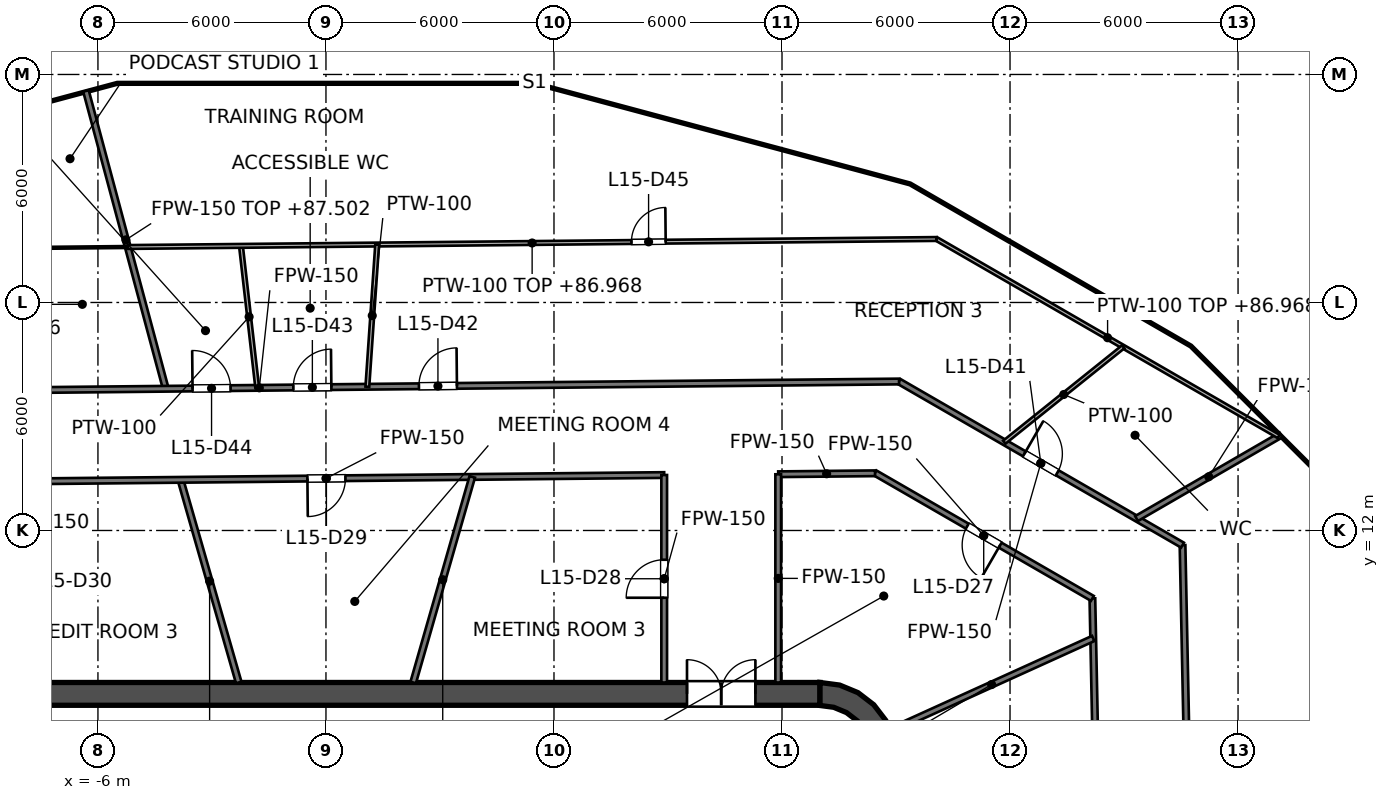
"""IFC4 building model, lengths in metres.
Left out: names, types, materials, properties, quantities, classifications, styles, units other than length and angle.
Written with IfcOpenShell. Run it as: python <this file> out.ifc"""

import sys

from ifc_helpers import new_model, si_unit, direction, frame, frame_2d, origin, place, context, subcontext, project, spatial, polyline, rectangle, outline, extrude, element, fill, save


model = new_model("IFC4")
c1 = context("Model", 3, precision=1e-05, world=origin(), true_north=direction((0.0, 1.0)))
c2 = subcontext(c1, "Body", "Model", "MODEL_VIEW")
j1 = project(units=[si_unit("LENGTHUNIT", "METRE"), si_unit("PLANEANGLEUNIT", "RADIAN")], contexts=[c1])
p1 = place(None, origin())
s1 = spatial("IfcSite", under=j1, at=p1, CompositionType="ELEMENT")
p2 = place(p1, origin())
s2 = spatial("IfcBuilding", under=s1, at=p2, CompositionType="ELEMENT")
p3 = place(p2, frame((0.0, 0.0, 84.0)))
s3 = spatial("IfcBuildingStorey", under=s2, at=p3, CompositionType="ELEMENT", Elevation=84.0)
p4 = place(p3, frame((-13.0, 7.7, 0.0), z_axis=(0.0, 0.0, 1.0), x_axis=(1.0, 0.0, 0.0)))
e1 = element("IfcWall", 1, at=p4, inside=s3, PredefinedType="SHEAR", context=c2, shape_type="SweptSolid", body=[
    extrude(rectangle(XDim=26.0, YDim=0.6, at=frame_2d((13.0, 0.0))), origin(), (0.0, 0.0, 1.0), 4.2),
])
p5 = place(p4, frame((1.7, 0.0, 0.0)))
e2 = element("IfcOpeningElement", 2, at=p5, cuts=e1, PredefinedType="OPENING", context=c2, shape_type="SweptSolid", body=[
    extrude(rectangle(XDim=1.8, YDim=2.1, at=frame_2d((0.9, 1.05))), frame((0.0, 0.3, 0.0), z_axis=(0.0, -1.0, 0.0), x_axis=(1.0, 0.0, 0.0)), (0.0, 0.0, 1.0), 0.6),
])
p6 = place(p4, frame((22.5, 0.0, 0.0)))
e3 = element("IfcOpeningElement", 3, at=p6, cuts=e1, PredefinedType="OPENING", context=c2, shape_type="SweptSolid", body=[
    extrude(rectangle(XDim=1.8, YDim=2.1, at=frame_2d((0.9, 1.05))), frame((0.0, 0.3, 0.0), z_axis=(0.0, -1.0, 0.0), x_axis=(1.0, 0.0, 0.0)), (0.0, 0.0, 1.0), 0.6),
])
p7 = place(p3, origin())
e4 = element("IfcWall", 4, at=p7, inside=s3, PredefinedType="SHEAR", context=c2, shape_type="SweptSolid", body=[
    extrude(outline(polyline([(13.0, 8.0), (13.0, 7.395), (13.361, 7.347), (13.698, 7.208), (13.986, 6.986), (14.208, 6.698), (14.347, 6.361), (14.395, 6.0), (15.0, 6.0), (14.932, 6.518), (14.732, 7.0), (14.414, 7.414), (14.0, 7.732), (13.518, 7.932), (13.0, 8.0)])), origin(), (0.0, 0.0, 1.0), 4.2),
])
p8 = place(p3, frame((-9.125, 7.0, 0.0), z_axis=(0.0, 0.0, 1.0), x_axis=(1.0, 0.0, 0.0)))
e5 = element("IfcWall", 5, at=p8, inside=s3, PredefinedType="SOLIDWALL", context=c2, shape_type="SweptSolid", body=[
    extrude(rectangle(XDim=18.25, YDim=0.8, at=frame_2d((9.125, 0.0))), origin(), (0.0, 0.0, 1.0), 4.05),
])
p9 = place(p3, frame((11.8, -7.4, 0.0), z_axis=(0.0, 0.0, 1.0), x_axis=(0.0, 1.0, 0.0)))
e6 = element("IfcWall", 6, at=p9, inside=s3, PredefinedType="SOLIDWALL", context=c2, shape_type="SweptSolid", body=[
    extrude(rectangle(XDim=14.8, YDim=0.4, at=frame_2d((7.4, 0.0))), origin(), (0.0, 0.0, 1.0), 4.05),
])
p10 = place(p9, frame((11.2, 0.0, 0.0)))
e7 = element("IfcOpeningElement", 7, at=p10, cuts=e6, PredefinedType="OPENING", context=c2, shape_type="SweptSolid", body=[
    extrude(rectangle(XDim=1.1, YDim=2.1, at=frame_2d((0.55, 1.05))), frame((0.0, 0.2, 0.0), z_axis=(0.0, -1.0, 0.0), x_axis=(1.0, 0.0, 0.0)), (0.0, 0.0, 1.0), 0.4),
])
p11 = place(p9, frame((8.3, 0.0, 0.0)))
e8 = element("IfcOpeningElement", 8, at=p11, cuts=e6, PredefinedType="OPENING", context=c2, shape_type="SweptSolid", body=[
    extrude(rectangle(XDim=1.1, YDim=2.1, at=frame_2d((0.55, 1.05))), frame((0.0, 0.2, 0.0), z_axis=(0.0, -1.0, 0.0), x_axis=(1.0, 0.0, 0.0)), (0.0, 0.0, 1.0), 0.4),
])
p12 = place(p9, frame((5.4, 0.0, 0.0)))
e9 = element("IfcOpeningElement", 9, at=p12, cuts=e6, PredefinedType="OPENING", context=c2, shape_type="SweptSolid", body=[
    extrude(rectangle(XDim=1.1, YDim=2.1, at=frame_2d((0.55, 1.05))), frame((0.0, 0.2, 0.0), z_axis=(0.0, -1.0, 0.0), x_axis=(1.0, 0.0, 0.0)), (0.0, 0.0, 1.0), 0.4),
])
p13 = place(p9, frame((13.552, 0.0, 0.0)))
e10 = element("IfcOpeningElement", 10, at=p13, cuts=e6, PredefinedType="OPENING", context=c2, shape_type="SweptSolid", body=[
    extrude(rectangle(XDim=0.9, YDim=2.1, at=frame_2d((0.45, 1.05))), frame((0.0, 0.2, 0.0), z_axis=(0.0, -1.0, 0.0), x_axis=(1.0, 0.0, 0.0)), (0.0, 0.0, 1.0), 0.4),
])
p14 = place(p9, frame((0.347, 0.0, 0.0)))
e11 = element("IfcOpeningElement", 11, at=p14, cuts=e6, PredefinedType="OPENING", context=c2, shape_type="SweptSolid", body=[
    extrude(rectangle(XDim=0.9, YDim=2.1, at=frame_2d((0.45, 1.05))), frame((0.0, 0.2, 0.0), z_axis=(0.0, -1.0, 0.0), x_axis=(1.0, 0.0, 0.0)), (0.0, 0.0, 1.0), 0.4),
])
p15 = place(p3, frame((20.167, 10.213, 0.0), z_axis=(0.0, 0.0, 1.0), x_axis=(0.020610894613, -0.999787572949, 0.0)))
e12 = element("IfcWall", 12, at=p15, inside=s3, PredefinedType="PARTITIONING", context=c2, shape_type="SweptSolid", body=[
    extrude(rectangle(XDim=17.637, YDim=0.15, at=frame_2d((8.819, 0.0))), origin(), (0.0, 0.0, 1.0), 2.968),
])
p16 = place(p15, frame((10.508, 0.0, 0.0)))
e13 = element("IfcOpeningElement", 13, at=p16, cuts=e12, PredefinedType="OPENING", context=c2, shape_type="SweptSolid", body=[
    extrude(rectangle(XDim=1.0, YDim=2.1, at=frame_2d((0.5, 1.05))), frame((0.0, 0.075, 0.0), z_axis=(0.0, -1.0, 0.0), x_axis=(1.0, 0.0, 0.0)), (0.0, 0.0, 1.0), 0.15),
])
p17 = place(p15, frame((5.09, 0.0, 0.0)))
e14 = element("IfcOpeningElement", 14, at=p17, cuts=e12, PredefinedType="OPENING", context=c2, shape_type="SweptSolid", body=[
    extrude(rectangle(XDim=1.0, YDim=2.1, at=frame_2d((0.5, 1.05))), frame((0.0, 0.075, 0.0), z_axis=(0.0, -1.0, 0.0), x_axis=(1.0, 0.0, 0.0)), (0.0, 0.0, 1.0), 0.15),
])
p18 = place(p3, frame((22.539, 11.615, 0.0), z_axis=(0.0, 0.0, 1.0), x_axis=(0.020601506683, -0.99978776644, 0.0)))
e15 = element("IfcWall", 15, at=p18, inside=s3, PredefinedType="PARTITIONING", context=c2, shape_type="SweptSolid", body=[
    extrude(rectangle(XDim=19.66, YDim=0.15, at=frame_2d((9.83, 0.0))), origin(), (0.0, 0.0, 1.0), 2.968),
])
p19 = place(p18, frame((13.54, 0.0, 0.0)))
e16 = element("IfcOpeningElement", 16, at=p19, cuts=e15, PredefinedType="OPENING", context=c2, shape_type="SweptSolid", body=[
    extrude(rectangle(XDim=1.0, YDim=2.1, at=frame_2d((0.5, 1.05))), frame((0.0, 0.075, 0.0), z_axis=(0.0, -1.0, 0.0), x_axis=(1.0, 0.0, 0.0)), (0.0, 0.0, 1.0), 0.15),
])
p20 = place(p18, frame((9.23, 0.0, 0.0)))
e17 = element("IfcOpeningElement", 17, at=p20, cuts=e15, PredefinedType="OPENING", context=c2, shape_type="SweptSolid", body=[
    extrude(rectangle(XDim=1.0, YDim=2.1, at=frame_2d((0.5, 1.05))), frame((0.0, 0.075, 0.0), z_axis=(0.0, -1.0, 0.0), x_axis=(1.0, 0.0, 0.0)), (0.0, 0.0, 1.0), 0.15),
])
p21 = place(p3, frame((-6.315, 23.566, 0.0), z_axis=(0.0, 0.0, 1.0), x_axis=(0.258844392232, -0.96591903419, 0.0)))
e18 = element("IfcWall", 18, at=p21, inside=s3, PredefinedType="PARTITIONING", context=c2, shape_type="SweptSolid", body=[
    extrude(rectangle(XDim=8.112, YDim=0.15, at=frame_2d((4.056, 0.0))), origin(), (0.0, 0.0, 1.0), 3.502),
])
p22 = place(p3, frame((-3.827, 13.333, 0.0), z_axis=(0.0, 0.0, 1.0), x_axis=(0.275935525478, -0.961176147113, 0.0)))
e19 = element("IfcWall", 19, at=p22, inside=s3, PredefinedType="PARTITIONING", context=c2, shape_type="SweptSolid", body=[
    extrude(rectangle(XDim=5.548, YDim=0.15, at=frame_2d((2.774, 0.0))), origin(), (0.0, 0.0, 1.0), 3.9),
])
p23 = place(p3, frame((14.448, 13.515, 0.0), z_axis=(0.0, 0.0, 1.0), x_axis=(0.866032288321, -0.499988075443, 0.0)))
e20 = element("IfcWall", 20, at=p23, inside=s3, PredefinedType="PARTITIONING", context=c2, shape_type="SweptSolid", body=[
    extrude(rectangle(XDim=6.604, YDim=0.15, at=frame_2d((3.302, 0.0))), origin(), (0.0, 0.0, 1.0), 2.968),
])
p24 = place(p23, frame((2.802, 0.0, 0.0)))
e21 = element("IfcOpeningElement", 21, at=p24, cuts=e20, PredefinedType="OPENING", context=c2, shape_type="SweptSolid", body=[
    extrude(rectangle(XDim=1.0, YDim=2.1, at=frame_2d((0.5, 1.05))), frame((0.0, 0.075, 0.0), z_axis=(0.0, -1.0, 0.0), x_axis=(1.0, 0.0, 0.0)), (0.0, 0.0, 1.0), 0.15),
])
p25 = place(p3, frame((15.08, 15.921, 0.0), z_axis=(0.0, 0.0, 1.0), x_axis=(0.866020838546, -0.500007907142, 0.0)))
e22 = element("IfcWall", 22, at=p25, inside=s3, PredefinedType="PARTITIONING", context=c2, shape_type="SweptSolid", body=[
    extrude(rectangle(XDim=8.613, YDim=0.15, at=frame_2d((4.306, 0.0))), origin(), (0.0, 0.0, 1.0), 2.968),
])
p26 = place(p25, frame((3.807, 0.0, 0.0)))
e23 = element("IfcOpeningElement", 23, at=p26, cuts=e22, PredefinedType="OPENING", context=c2, shape_type="SweptSolid", body=[
    extrude(rectangle(XDim=1.0, YDim=2.1, at=frame_2d((0.5, 1.05))), frame((0.0, 0.075, 0.0), z_axis=(0.0, -1.0, 0.0), x_axis=(1.0, 0.0, 0.0)), (0.0, 0.0, 1.0), 0.15),
])
p27 = place(p3, frame((-8.9, 13.282, 0.0), z_axis=(0.0, 0.0, 1.0), x_axis=(0.999950834077, 0.009916119672, 0.0)))
e24 = element("IfcWall", 24, at=p27, inside=s3, PredefinedType="PARTITIONING", context=c2, shape_type="SweptSolid", body=[
    extrude(rectangle(XDim=17.801, YDim=0.15, at=frame_2d((8.9, 0.0))), origin(), (0.0, 0.0, 1.0), 2.968),
])
p28 = place(p27, frame((8.412, 0.0, 0.0)))
e25 = element("IfcOpeningElement", 25, at=p28, cuts=e24, PredefinedType="OPENING", context=c2, shape_type="SweptSolid", body=[
    extrude(rectangle(XDim=1.0, YDim=2.1, at=frame_2d((0.5, 1.05))), frame((0.0, 0.075, 0.0), z_axis=(0.0, -1.0, 0.0), x_axis=(1.0, 0.0, 0.0)), (0.0, 0.0, 1.0), 0.15),
])
p29 = place(p3, frame((11.9, 13.48, 0.0), z_axis=(0.0, 0.0, 1.0), x_axis=(0.999950357576, 0.009964054536, 0.0)))
e26 = element("IfcWall", 26, at=p29, inside=s3, PredefinedType="PARTITIONING", context=c2, shape_type="SweptSolid", body=[
    extrude(rectangle(XDim=2.548, YDim=0.15, at=frame_2d((1.274, 0.0))), origin(), (0.0, 0.0, 1.0), 2.968),
])
p30 = place(p3, frame((-18.587, 15.587, 0.0), z_axis=(0.0, 0.0, 1.0), x_axis=(0.99995087003, 0.009912493396, 0.0)))
e27 = element("IfcWall", 27, at=p30, inside=s3, PredefinedType="PARTITIONING", context=c2, shape_type="SweptSolid", body=[
    extrude(rectangle(XDim=33.669, YDim=0.15, at=frame_2d((16.834, 0.0))), origin(), (0.0, 0.0, 1.0), 2.968),
])
p31 = place(p30, frame((21.034, 0.0, 0.0)))
e28 = element("IfcOpeningElement", 28, at=p31, cuts=e27, PredefinedType="OPENING", context=c2, shape_type="SweptSolid", body=[
    extrude(rectangle(XDim=1.0, YDim=2.1, at=frame_2d((0.5, 1.05))), frame((0.0, 0.075, 0.0), z_axis=(0.0, -1.0, 0.0), x_axis=(1.0, 0.0, 0.0)), (0.0, 0.0, 1.0), 0.15),
])
p32 = place(p30, frame((17.73, 0.0, 0.0)))
e29 = element("IfcOpeningElement", 29, at=p32, cuts=e27, PredefinedType="OPENING", context=c2, shape_type="SweptSolid", body=[
    extrude(rectangle(XDim=1.0, YDim=2.1, at=frame_2d((0.5, 1.05))), frame((0.0, 0.075, 0.0), z_axis=(0.0, -1.0, 0.0), x_axis=(1.0, 0.0, 0.0)), (0.0, 0.0, 1.0), 0.15),
])
p33 = place(p30, frame((15.077, 0.0, 0.0)))
e30 = element("IfcOpeningElement", 30, at=p33, cuts=e27, PredefinedType="OPENING", context=c2, shape_type="SweptSolid", body=[
    extrude(rectangle(XDim=1.0, YDim=2.1, at=frame_2d((0.5, 1.05))), frame((0.0, 0.075, 0.0), z_axis=(0.0, -1.0, 0.0), x_axis=(1.0, 0.0, 0.0)), (0.0, 0.0, 1.0), 0.15),
])
p34 = place(p30, frame((10.026, 0.0, 0.0)))
e31 = element("IfcOpeningElement", 31, at=p34, cuts=e27, PredefinedType="OPENING", context=c2, shape_type="SweptSolid", body=[
    extrude(rectangle(XDim=1.0, YDim=2.1, at=frame_2d((0.5, 1.05))), frame((0.0, 0.075, 0.0), z_axis=(0.0, -1.0, 0.0), x_axis=(1.0, 0.0, 0.0)), (0.0, 0.0, 1.0), 0.15),
])
p35 = place(p30, frame((2.737, 0.0, 0.0)))
e32 = element("IfcOpeningElement", 32, at=p35, cuts=e27, PredefinedType="OPENING", context=c2, shape_type="SweptSolid", body=[
    extrude(rectangle(XDim=1.0, YDim=2.1, at=frame_2d((0.5, 1.05))), frame((0.0, 0.075, 0.0), z_axis=(0.0, -1.0, 0.0), x_axis=(1.0, 0.0, 0.0)), (0.0, 0.0, 1.0), 0.15),
])
p36 = place(p3, frame((14.843, 6.733, 0.0), z_axis=(0.0, 0.0, 1.0), x_axis=(0.910628361306, 0.413226315214, 0.0)))
e33 = element("IfcWall", 33, at=p36, inside=s3, PredefinedType="PARTITIONING", context=c2, shape_type="SweptSolid", body=[
    extrude(rectangle(XDim=5.87, YDim=0.15, at=frame_2d((2.935, 0.0))), origin(), (0.0, 0.0, 1.0), 3.9),
])
p37 = place(p3, frame((21.329, 12.314, 0.0), z_axis=(0.0, 0.0, 1.0), x_axis=(0.865416132284, 0.501053807472, 0.0)))
e34 = element("IfcWall", 34, at=p37, inside=s3, PredefinedType="PARTITIONING", context=c2, shape_type="SweptSolid", body=[
    extrude(rectangle(XDim=4.39, YDim=0.15, at=frame_2d((2.195, 0.0))), origin(), (0.0, 0.0, 1.0), 3.045),
])
p38 = place(p3, frame((2.296, 8.0, 0.0), z_axis=(0.0, 0.0, 1.0), x_axis=(0.275958345059, 0.961169595749, 0.0)))
e35 = element("IfcWall", 35, at=p38, inside=s3, PredefinedType="PARTITIONING", context=c2, shape_type="SweptSolid", body=[
    extrude(rectangle(XDim=5.628, YDim=0.15, at=frame_2d((2.814, 0.0))), origin(), (0.0, 0.0, 1.0), 3.9),
])
p39 = place(p3, frame((11.9, 8.0, 0.0), z_axis=(0.0, 0.0, 1.0), x_axis=(0.0, 1.0, 0.0)))
e36 = element("IfcWall", 36, at=p39, inside=s3, PredefinedType="PARTITIONING", context=c2, shape_type="SweptSolid", body=[
    extrude(rectangle(XDim=5.479, YDim=0.15, at=frame_2d((2.74, 0.0))), origin(), (0.0, 0.0, 1.0), 2.968),
])
p40 = place(p3, frame((8.9, 8.0, 0.0), z_axis=(0.0, 0.0, 1.0), x_axis=(0.0, 1.0, 0.0)))
e37 = element("IfcWall", 37, at=p40, inside=s3, PredefinedType="PARTITIONING", context=c2, shape_type="SweptSolid", body=[
    extrude(rectangle(XDim=5.46, YDim=0.15, at=frame_2d((2.73, 0.0))), origin(), (0.0, 0.0, 1.0), 2.968),
])
p41 = place(p40, frame((2.23, 0.0, 0.0)))
e38 = element("IfcOpeningElement", 38, at=p41, cuts=e37, PredefinedType="OPENING", context=c2, shape_type="SweptSolid", body=[
    extrude(rectangle(XDim=1.0, YDim=2.1, at=frame_2d((0.5, 1.05))), frame((0.0, 0.075, 0.0), z_axis=(0.0, -1.0, 0.0), x_axis=(1.0, 0.0, 0.0)), (0.0, 0.0, 1.0), 0.15),
])
p42 = place(p3, frame((-18.512, 19.328, 0.0), z_axis=(0.0, 0.0, 1.0), x_axis=(0.999950851933, 0.009914318817, 0.0)))
e39 = element("IfcWall", 39, at=p42, inside=s3, PredefinedType="PARTITIONING", context=c2, shape_type="SweptSolid", body=[
    extrude(rectangle(XDim=13.298, YDim=0.05, at=frame_2d((6.649, 0.0))), origin(), (0.0, 0.0, 1.0), 2.968),
])
p43 = place(p42, frame((7.975, 0.0, 0.0)))
e40 = element("IfcOpeningElement", 40, at=p43, cuts=e39, PredefinedType="OPENING", context=c2, shape_type="SweptSolid", body=[
    extrude(rectangle(XDim=1.0, YDim=2.1, at=frame_2d((0.5, 1.05))), frame((0.0, 0.025, 0.0), z_axis=(0.0, -1.0, 0.0), x_axis=(1.0, 0.0, 0.0)), (0.0, 0.0, 1.0), 0.05),
])
p44 = place(p42, frame((2.003, 0.0, 0.0)))
e41 = element("IfcOpeningElement", 41, at=p44, cuts=e39, PredefinedType="OPENING", context=c2, shape_type="SweptSolid", body=[
    extrude(rectangle(XDim=1.0, YDim=2.1, at=frame_2d((0.5, 1.05))), frame((0.0, 0.025, 0.0), z_axis=(0.0, -1.0, 0.0), x_axis=(1.0, 0.0, 0.0)), (0.0, 0.0, 1.0), 0.05),
])
p45 = place(p3, frame((-2.237, 19.49, 0.0), z_axis=(0.0, 0.0, 1.0), x_axis=(0.114064733863, -0.993473319465, 0.0)))
e42 = element("IfcWall", 42, at=p45, inside=s3, PredefinedType="PARTITIONING", context=c2, shape_type="SweptSolid", body=[
    extrude(rectangle(XDim=3.761, YDim=0.1, at=frame_2d((1.88, 0.0))), origin(), (0.0, 0.0, 1.0), 3.9),
])
p46 = place(p3, frame((16.065, 19.671, 0.0), z_axis=(0.0, 0.0, 1.0), x_axis=(0.866058502288, -0.499942667328, 0.0)))
e43 = element("IfcWall", 43, at=p46, inside=s3, PredefinedType="PARTITIONING", context=c2, shape_type="SweptSolid", body=[
    extrude(rectangle(XDim=10.397, YDim=0.1, at=frame_2d((5.198, 0.0))), origin(), (0.0, 0.0, 1.0), 2.968),
])
p47 = place(p3, frame((-5.215, 19.46, 0.0), z_axis=(0.0, 0.0, 1.0), x_axis=(0.999950988801, 0.00990050484, 0.0)))
e44 = element("IfcWall", 44, at=p47, inside=s3, PredefinedType="PARTITIONING", context=c2, shape_type="SweptSolid", body=[
    extrude(rectangle(XDim=21.281, YDim=0.1, at=frame_2d((10.641, 0.0))), origin(), (0.0, 0.0, 1.0), 2.968),
])
p48 = place(p47, frame((13.255, 0.0, 0.0)))
e45 = element("IfcOpeningElement", 45, at=p48, cuts=e44, PredefinedType="OPENING", context=c2, shape_type="SweptSolid", body=[
    extrude(rectangle(XDim=0.9, YDim=2.1, at=frame_2d((0.45, 1.05))), frame((0.0, 0.05, 0.0), z_axis=(0.0, -1.0, 0.0), x_axis=(1.0, 0.0, 0.0)), (0.0, 0.0, 1.0), 0.1),
])
p49 = place(p3, frame((17.849, 14.323, 0.0), z_axis=(0.0, 0.0, 1.0), x_axis=(0.7800073623, 0.625770337071, 0.0)))
e46 = element("IfcWall", 46, at=p49, inside=s3, PredefinedType="PARTITIONING", context=c2, shape_type="SweptSolid", body=[
    extrude(rectangle(XDim=4.013, YDim=0.1, at=frame_2d((2.006, 0.0))), origin(), (0.0, 0.0, 1.0), 3.9),
])
p50 = place(p3, frame((1.089, 15.783, 0.0), z_axis=(0.0, 0.0, 1.0), x_axis=(0.068735075686, 0.99763494795, 0.0)))
e47 = element("IfcWall", 47, at=p50, inside=s3, PredefinedType="PARTITIONING", context=c2, shape_type="SweptSolid", body=[
    extrude(rectangle(XDim=3.751, YDim=0.1, at=frame_2d((1.875, 0.0))), origin(), (0.0, 0.0, 1.0), 3.9),
])
p51 = place(p13, origin())
e48 = element("IfcDoor", 48, at=p51, inside=s3, OperationType="SINGLE_SWING_RIGHT", PredefinedType="DOOR", context=c2, shape_type="SweptSolid", body=[
    extrude(rectangle(XDim=0.9, YDim=2.1, at=frame_2d((0.45, 1.05))), frame((0.0, 0.025, 0.0), z_axis=(0.0, -1.0, 0.0), x_axis=(1.0, 0.0, 0.0)), (0.0, 0.0, 1.0), 0.05),
])
fill(e10, e48)
p52 = place(p6, origin())
e49 = element("IfcDoor", 49, at=p52, inside=s3, OperationType="DOUBLE_DOOR_SINGLE_SWING", PredefinedType="DOOR", context=c2, shape_type="SweptSolid", body=[
    extrude(rectangle(XDim=1.8, YDim=2.1, at=frame_2d((0.9, 1.05))), frame((0.0, 0.025, 0.0), z_axis=(0.0, -1.0, 0.0), x_axis=(1.0, 0.0, 0.0)), (0.0, 0.0, 1.0), 0.05),
])
fill(e3, e49)
p53 = place(p24, origin())
e50 = element("IfcDoor", 50, at=p53, inside=s3, OperationType="SINGLE_SWING_RIGHT", PredefinedType="DOOR", context=c2, shape_type="SweptSolid", body=[
    extrude(rectangle(XDim=1.0, YDim=2.1, at=frame_2d((0.5, 1.05))), frame((0.0, 0.025, 0.0), z_axis=(0.0, -1.0, 0.0), x_axis=(1.0, 0.0, 0.0)), (0.0, 0.0, 1.0), 0.05),
])
fill(e21, e50)
p54 = place(p41, origin())
e51 = element("IfcDoor", 51, at=p54, inside=s3, OperationType="SINGLE_SWING_LEFT", PredefinedType="DOOR", context=c2, shape_type="SweptSolid", body=[
    extrude(rectangle(XDim=1.0, YDim=2.1, at=frame_2d((0.5, 1.05))), frame((0.0, 0.025, 0.0), z_axis=(0.0, -1.0, 0.0), x_axis=(1.0, 0.0, 0.0)), (0.0, 0.0, 1.0), 0.05),
])
fill(e38, e51)
p55 = place(p28, origin())
e52 = element("IfcDoor", 52, at=p55, inside=s3, OperationType="SINGLE_SWING_LEFT", PredefinedType="DOOR", context=c2, shape_type="SweptSolid", body=[
    extrude(rectangle(XDim=1.0, YDim=2.1, at=frame_2d((0.5, 1.05))), frame((0.0, 0.025, 0.0), z_axis=(0.0, -1.0, 0.0), x_axis=(1.0, 0.0, 0.0)), (0.0, 0.0, 1.0), 0.05),
])
fill(e25, e52)
p56 = place(p26, origin())
e53 = element("IfcDoor", 53, at=p56, inside=s3, OperationType="SINGLE_SWING_LEFT", PredefinedType="DOOR", context=c2, shape_type="SweptSolid", body=[
    extrude(rectangle(XDim=1.0, YDim=2.1, at=frame_2d((0.5, 1.05))), frame((0.0, 0.025, 0.0), z_axis=(0.0, -1.0, 0.0), x_axis=(1.0, 0.0, 0.0)), (0.0, 0.0, 1.0), 0.05),
])
fill(e23, e53)
p57 = place(p31, origin())
e54 = element("IfcDoor", 54, at=p57, inside=s3, OperationType="SINGLE_SWING_RIGHT", PredefinedType="DOOR", context=c2, shape_type="SweptSolid", body=[
    extrude(rectangle(XDim=1.0, YDim=2.1, at=frame_2d((0.5, 1.05))), frame((0.0, 0.025, 0.0), z_axis=(0.0, -1.0, 0.0), x_axis=(1.0, 0.0, 0.0)), (0.0, 0.0, 1.0), 0.05),
])
fill(e28, e54)
p58 = place(p32, origin())
e55 = element("IfcDoor", 55, at=p58, inside=s3, OperationType="SINGLE_SWING_RIGHT", PredefinedType="DOOR", context=c2, shape_type="SweptSolid", body=[
    extrude(rectangle(XDim=1.0, YDim=2.1, at=frame_2d((0.5, 1.05))), frame((0.0, 0.025, 0.0), z_axis=(0.0, -1.0, 0.0), x_axis=(1.0, 0.0, 0.0)), (0.0, 0.0, 1.0), 0.05),
])
fill(e29, e55)
p59 = place(p33, origin())
e56 = element("IfcDoor", 56, at=p59, inside=s3, OperationType="SINGLE_SWING_LEFT", PredefinedType="DOOR", context=c2, shape_type="SweptSolid", body=[
    extrude(rectangle(XDim=1.0, YDim=2.1, at=frame_2d((0.5, 1.05))), frame((0.0, 0.025, 0.0), z_axis=(0.0, -1.0, 0.0), x_axis=(1.0, 0.0, 0.0)), (0.0, 0.0, 1.0), 0.05),
])
fill(e30, e56)
p60 = place(p48, origin())
e57 = element("IfcDoor", 57, at=p60, inside=s3, OperationType="SINGLE_SWING_RIGHT", PredefinedType="DOOR", context=c2, shape_type="SweptSolid", body=[
    extrude(rectangle(XDim=0.9, YDim=2.1, at=frame_2d((0.45, 1.05))), frame((0.0, 0.025, 0.0), z_axis=(0.0, -1.0, 0.0), x_axis=(1.0, 0.0, 0.0)), (0.0, 0.0, 1.0), 0.05),
])
fill(e45, e57)
save(model, sys.argv[1])
